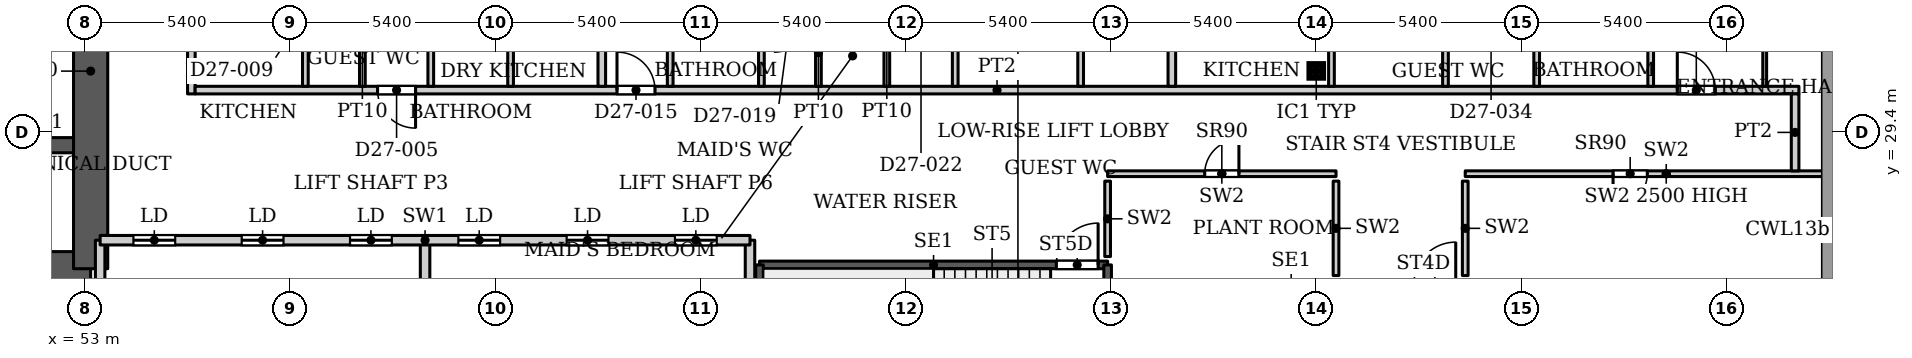
"""IFC4 building model, lengths in metres.
Left out: names, types, materials, properties, quantities, classifications, styles, units other than length and angle.
Written with IfcOpenShell. Run it as: python <this file> out.ifc"""

import sys

from ifc_helpers import new_model, si_unit, direction, frame, frame_2d, origin, origin_2d, place, context, subcontext, project, spatial, rectangle, hollow_rectangle, extrude, source, transform, mapped, element, fill, save


model = new_model("IFC4")
c1 = context("Model", 3, precision=1e-05, world=origin(), true_north=direction((0.0, 1.0)))
c2 = subcontext(c1, "Body", "Model", "MODEL_VIEW")
j1 = project(units=[si_unit("LENGTHUNIT", "METRE"), si_unit("PLANEANGLEUNIT", "RADIAN")], contexts=[c1])
p1 = place(None, origin())
s1 = spatial("IfcSite", under=j1, at=p1, CompositionType="ELEMENT")
p2 = place(p1, origin())
s2 = spatial("IfcBuilding", under=s1, at=p2, CompositionType="ELEMENT")
p3 = place(p2, frame((0.0, 0.0, 117.5)))
s3 = spatial("IfcBuildingStorey", under=s2, at=p3, CompositionType="ELEMENT", Elevation=117.5)
p4 = place(p3, frame((85.4, 31.005, 0.0), z_axis=(0.0, 0.0, 1.0), x_axis=(1.0, 0.0, 0.0)))
e1 = element("IfcColumn", 1, at=p4, inside=s3, PredefinedType="COLUMN", context=c2, shape_type="SweptSolid", body=[
    extrude(hollow_rectangle(XDim=0.356, YDim=0.356, WallThickness=0.016, InnerFilletRadius=0.016, OuterFilletRadius=0.032, at=origin_2d()), origin(), (0.0, 0.0, 1.0), 3.9),
])
p5 = place(p3, frame((34.75, 25.8, 0.0), z_axis=(0.0, 0.0, 1.0), x_axis=(1.0, 0.0, 0.0)))
e2 = element("IfcWall", 2, at=p5, inside=s3, PredefinedType="SHEAR", context=c2, shape_type="SweptSolid", body=[
    extrude(rectangle(XDim=18.4, YDim=0.9, at=frame_2d((9.2, 0.0))), origin(), (0.0, 0.0, 1.0), 3.9),
])
p6 = place(p3, frame((34.75, 29.05, 0.0), z_axis=(0.0, 0.0, 1.0), x_axis=(1.0, 0.0, 0.0)))
e3 = element("IfcWall", 3, at=p6, inside=s3, PredefinedType="SHEAR", context=c2, shape_type="SweptSolid", body=[
    extrude(rectangle(XDim=18.4, YDim=0.4, at=frame_2d((9.2, 0.0))), origin(), (0.0, 0.0, 1.0), 3.9),
])
p7 = place(p6, frame((15.125, 0.0, 0.0)))
e4 = element("IfcOpeningElement", 4, at=p7, cuts=e3, PredefinedType="OPENING", context=c2, shape_type="SweptSolid", body=[
    extrude(rectangle(XDim=1.1, YDim=2.2, at=frame_2d((0.55, 1.1))), frame((0.0, 0.21, 0.0), z_axis=(0.0, -1.0, 0.0), x_axis=(1.0, 0.0, 0.0)), (0.0, 0.0, 1.0), 0.42),
])
p8 = place(p3, frame((53.15, 25.8, 0.0), z_axis=(0.0, 0.0, 1.0), x_axis=(0.0, 1.0, 0.0)))
e5 = element("IfcWall", 5, at=p8, inside=s3, PredefinedType="SHEAR", context=c2, shape_type="SweptSolid", body=[
    extrude(rectangle(XDim=10.4, YDim=0.9, at=frame_2d((5.2, 0.0))), origin(), (0.0, 0.0, 1.0), 3.9),
])
p9 = place(p3, frame((70.75, 25.9, 0.0), z_axis=(0.0, 0.0, 1.0), x_axis=(1.0, 0.0, 0.0)))
e6 = element("IfcWall", 6, at=p9, inside=s3, PredefinedType="SHEAR", context=c2, shape_type="SweptSolid", body=[
    extrude(rectangle(XDim=9.16, YDim=0.2, at=frame_2d((4.58, 0.0))), origin(), (0.0, 0.0, 1.0), 3.9),
])
p10 = place(p9, frame((7.81, 0.0, 0.0)))
e7 = element("IfcOpeningElement", 7, at=p10, cuts=e6, PredefinedType="OPENING", context=c2, shape_type="SweptSolid", body=[
    extrude(rectangle(XDim=1.1, YDim=2.2, at=frame_2d((0.55, 1.1))), frame((0.0, 0.11, 0.0), z_axis=(0.0, -1.0, 0.0), x_axis=(1.0, 0.0, 0.0)), (0.0, 0.0, 1.0), 0.22),
])
for number, where, z_axis, x_axis in (
    (8, (70.75, 22.75, 0.0), (0.0, 0.0, 1.0), (0.0, 1.0, 0.0)),
    (9, (79.91, 22.75, 0.0), (0.0, 0.0, 1.0), (0.0, 1.0, 0.0)),
):
    element("IfcWall", number, at=place(p3, frame(where, z_axis=z_axis, x_axis=x_axis)), inside=s3, PredefinedType="SHEAR", context=c2, shape_type="SweptSolid", body=[
        extrude(rectangle(XDim=3.15, YDim=0.2, at=frame_2d((1.575, 0.0))), origin(), (0.0, 0.0, 1.0), 3.9),
    ])
for number, where, z_axis, x_axis in (
    (10, (53.4, 23.7, 0.0), (0.0, 0.0, 1.0), (0.0, 1.0, 0.0)),
    (11, (61.95, 23.7, 0.0), (0.0, 0.0, 1.0), (0.0, 1.0, 0.0)),
    (12, (70.5, 23.7, 0.0), (0.0, 0.0, 1.0), (0.0, 1.0, 0.0)),
):
    element("IfcWall", number, at=place(p3, frame(where, z_axis=z_axis, x_axis=x_axis)), inside=s3, PredefinedType="PARTITIONING", context=c2, shape_type="SweptSolid", body=[
        extrude(rectangle(XDim=2.85, YDim=0.25, at=frame_2d((1.425, 0.0))), origin(), (0.0, 0.0, 1.0), 3.9),
    ])
p11 = place(p3, frame((53.4, 26.55, 0.0), z_axis=(0.0, 0.0, 1.0), x_axis=(1.0, 0.0, 0.0)))
e13 = element("IfcWall", 13, at=p11, inside=s3, PredefinedType="PARTITIONING", context=c2, shape_type="SweptSolid", body=[
    extrude(rectangle(XDim=17.1, YDim=0.25, at=frame_2d((8.55, 0.0))), origin(), (0.0, 0.0, 1.0), 3.9),
])
p12 = place(p11, frame((0.875, 0.0, 0.0)))
e14 = element("IfcOpeningElement", 14, at=p12, cuts=e13, PredefinedType="OPENING", context=c2, shape_type="SweptSolid", body=[
    extrude(rectangle(XDim=1.1, YDim=2.2, at=frame_2d((0.55, 1.1))), frame((0.0, 0.135, 0.0), z_axis=(0.0, -1.0, 0.0), x_axis=(1.0, 0.0, 0.0)), (0.0, 0.0, 1.0), 0.27),
])
p13 = place(p11, frame((3.725, 0.0, 0.0)))
e15 = element("IfcOpeningElement", 15, at=p13, cuts=e13, PredefinedType="OPENING", context=c2, shape_type="SweptSolid", body=[
    extrude(rectangle(XDim=1.1, YDim=2.2, at=frame_2d((0.55, 1.1))), frame((0.0, 0.135, 0.0), z_axis=(0.0, -1.0, 0.0), x_axis=(1.0, 0.0, 0.0)), (0.0, 0.0, 1.0), 0.27),
])
p14 = place(p11, frame((6.575, 0.0, 0.0)))
e16 = element("IfcOpeningElement", 16, at=p14, cuts=e13, PredefinedType="OPENING", context=c2, shape_type="SweptSolid", body=[
    extrude(rectangle(XDim=1.1, YDim=2.2, at=frame_2d((0.55, 1.1))), frame((0.0, 0.135, 0.0), z_axis=(0.0, -1.0, 0.0), x_axis=(1.0, 0.0, 0.0)), (0.0, 0.0, 1.0), 0.27),
])
p15 = place(p11, frame((9.425, 0.0, 0.0)))
e17 = element("IfcOpeningElement", 17, at=p15, cuts=e13, PredefinedType="OPENING", context=c2, shape_type="SweptSolid", body=[
    extrude(rectangle(XDim=1.1, YDim=2.2, at=frame_2d((0.55, 1.1))), frame((0.0, 0.135, 0.0), z_axis=(0.0, -1.0, 0.0), x_axis=(1.0, 0.0, 0.0)), (0.0, 0.0, 1.0), 0.27),
])
p16 = place(p11, frame((12.275, 0.0, 0.0)))
e18 = element("IfcOpeningElement", 18, at=p16, cuts=e13, PredefinedType="OPENING", context=c2, shape_type="SweptSolid", body=[
    extrude(rectangle(XDim=1.1, YDim=2.2, at=frame_2d((0.55, 1.1))), frame((0.0, 0.135, 0.0), z_axis=(0.0, -1.0, 0.0), x_axis=(1.0, 0.0, 0.0)), (0.0, 0.0, 1.0), 0.27),
])
p17 = place(p11, frame((15.125, 0.0, 0.0)))
e19 = element("IfcOpeningElement", 19, at=p17, cuts=e13, PredefinedType="OPENING", context=c2, shape_type="SweptSolid", body=[
    extrude(rectangle(XDim=1.1, YDim=2.2, at=frame_2d((0.55, 1.1))), frame((0.0, 0.135, 0.0), z_axis=(0.0, -1.0, 0.0), x_axis=(1.0, 0.0, 0.0)), (0.0, 0.0, 1.0), 0.27),
])
p18 = place(p3, frame((79.91, 28.3, 0.0), z_axis=(0.0, 0.0, 1.0), x_axis=(1.0, 0.0, 0.0)))
e20 = element("IfcWall", 20, at=p18, inside=s3, PredefinedType="PARTITIONING", context=c2, shape_type="SweptSolid", body=[
    extrude(rectangle(XDim=6.01, YDim=0.15, at=frame_2d((3.005, 0.0))), origin(), (0.0, 0.0, 1.0), 3.9),
])
p19 = place(p18, frame((2.555, 0.0, 0.0)))
e21 = element("IfcOpeningElement", 21, at=p19, cuts=e20, PredefinedType="OPENING", context=c2, shape_type="SweptSolid", body=[
    extrude(rectangle(XDim=0.9, YDim=2.2, at=frame_2d((0.45, 1.1))), frame((0.0, 0.085, 0.0), z_axis=(0.0, -1.0, 0.0), x_axis=(1.0, 0.0, 0.0)), (0.0, 0.0, 1.0), 0.17),
])
p20 = place(p3, frame((79.91, 26.12, 0.0), z_axis=(0.0, 0.0, 1.0), x_axis=(0.0, 1.0, 0.0)))
e22 = element("IfcWall", 22, at=p20, inside=s3, PredefinedType="PARTITIONING", context=c2, shape_type="SweptSolid", body=[
    extrude(rectangle(XDim=1.985, YDim=0.15, at=frame_2d((0.992, 0.0))), origin(), (0.0, 0.0, 1.0), 3.9),
])
p21 = place(p3, frame((85.92, 25.62, 0.0), z_axis=(0.0, 0.0, 1.0), x_axis=(0.0, 1.0, 0.0)))
e23 = element("IfcWall", 23, at=p21, inside=s3, PredefinedType="PARTITIONING", context=c2, shape_type="SweptSolid", body=[
    extrude(rectangle(XDim=2.485, YDim=0.15, at=frame_2d((1.242, 0.0))), origin(), (0.0, 0.0, 1.0), 3.9),
])
p22 = place(p3, frame((89.32, 28.3, 0.0), z_axis=(0.0, 0.0, 1.0), x_axis=(1.0, 0.0, 0.0)))
e24 = element("IfcWall", 24, at=p22, inside=s3, PredefinedType="PARTITIONING", context=c2, shape_type="SweptSolid", body=[
    extrude(rectangle(XDim=10.578, YDim=0.15, at=frame_2d((5.289, 0.0))), origin(), (0.0, 0.0, 1.0), 2.5),
])
p23 = place(p22, frame((3.89, 0.0, 0.0)))
e25 = element("IfcOpeningElement", 25, at=p23, cuts=e24, PredefinedType="OPENING", context=c2, shape_type="SweptSolid", body=[
    extrude(rectangle(XDim=0.9, YDim=2.2, at=frame_2d((0.45, 1.1))), frame((0.0, 0.085, 0.0), z_axis=(0.0, -1.0, 0.0), x_axis=(1.0, 0.0, 0.0)), (0.0, 0.0, 1.0), 0.17),
])
p24 = place(p3, frame((89.32, 25.62, 0.0), z_axis=(0.0, 0.0, 1.0), x_axis=(0.0, 1.0, 0.0)))
e26 = element("IfcWall", 26, at=p24, inside=s3, PredefinedType="PARTITIONING", context=c2, shape_type="SweptSolid", body=[
    extrude(rectangle(XDim=2.485, YDim=0.15, at=frame_2d((1.242, 0.0))), origin(), (0.0, 0.0, 1.0), 3.9),
])
p25 = place(p3, frame((55.8, 30.4, 0.0), z_axis=(0.0, 0.0, 1.0), x_axis=(0.0, 1.0, 0.0)))
e27 = element("IfcWall", 27, at=p25, inside=s3, PredefinedType="PARTITIONING", context=c2, shape_type="SweptSolid", body=[
    extrude(rectangle(XDim=13.5, YDim=0.2, at=frame_2d((6.75, 0.0))), origin(), (0.0, 0.0, 1.0), 3.6),
])
p26 = place(p3, frame((55.9, 30.5, 0.0), z_axis=(0.0, 0.0, 1.0), x_axis=(1.0, 0.0, 0.0)))
e28 = element("IfcWall", 28, at=p26, inside=s3, PredefinedType="PARTITIONING", context=c2, shape_type="SweptSolid", body=[
    extrude(rectangle(XDim=42.2, YDim=0.2, at=frame_2d((21.1, 0.0))), origin(), (0.0, 0.0, 1.0), 3.6),
])
p27 = place(p26, frame((4.8, 0.0, 0.0)))
e29 = element("IfcOpeningElement", 29, at=p27, cuts=e28, PredefinedType="OPENING", context=c2, shape_type="SweptSolid", body=[
    extrude(rectangle(XDim=1.0, YDim=2.1, at=frame_2d((0.5, 1.05))), frame((0.0, 0.11, 0.0), z_axis=(0.0, -1.0, 0.0), x_axis=(1.0, 0.0, 0.0)), (0.0, 0.0, 1.0), 0.22),
])
p28 = place(p26, frame((11.1, 0.0, 0.0)))
e30 = element("IfcOpeningElement", 30, at=p28, cuts=e28, PredefinedType="OPENING", context=c2, shape_type="SweptSolid", body=[
    extrude(rectangle(XDim=1.0, YDim=2.1, at=frame_2d((0.5, 1.05))), frame((0.0, 0.11, 0.0), z_axis=(0.0, -1.0, 0.0), x_axis=(1.0, 0.0, 0.0)), (0.0, 0.0, 1.0), 0.22),
])
p29 = place(p26, frame((39.0, 0.0, 0.0)))
e31 = element("IfcOpeningElement", 31, at=p29, cuts=e28, PredefinedType="OPENING", context=c2, shape_type="SweptSolid", body=[
    extrude(rectangle(XDim=1.0, YDim=2.1, at=frame_2d((0.5, 1.05))), frame((0.0, 0.11, 0.0), z_axis=(0.0, -1.0, 0.0), x_axis=(1.0, 0.0, 0.0)), (0.0, 0.0, 1.0), 0.22),
])
for number, where, z_axis, x_axis in (
    (32, (58.8, 30.6, 0.0), (0.0, 0.0, 1.0), (0.0, 1.0, 0.0)),
    (33, (60.3, 30.6, 0.0), (0.0, 0.0, 1.0), (0.0, 1.0, 0.0)),
    (34, (62.1, 30.6, 0.0), (0.0, 0.0, 1.0), (0.0, 1.0, 0.0)),
    (35, (64.2, 30.6, 0.0), (0.0, 0.0, 1.0), (0.0, 1.0, 0.0)),
):
    element("IfcWall", number, at=place(p3, frame(where, z_axis=z_axis, x_axis=x_axis)), inside=s3, PredefinedType="PARTITIONING", context=c2, shape_type="SweptSolid", body=[
        extrude(rectangle(XDim=3.025, YDim=0.15, at=frame_2d((1.512, 0.0))), origin(), (0.0, 0.0, 1.0), 3.6),
    ])
p30 = place(p3, frame((66.6, 30.6, 0.0), z_axis=(0.0, 0.0, 1.0), x_axis=(0.0, 1.0, 0.0)))
e36 = element("IfcWall", 36, at=p30, inside=s3, PredefinedType="PARTITIONING", context=c2, shape_type="SweptSolid", body=[
    extrude(rectangle(XDim=13.3, YDim=0.2, at=frame_2d((6.65, 0.0))), origin(), (0.0, 0.0, 1.0), 3.6),
])
for number, where, z_axis, x_axis in (
    (37, (68.4, 30.6, 0.0), (0.0, 0.0, 1.0), (0.0, 1.0, 0.0)),
    (38, (70.8, 30.6, 0.0), (0.0, 0.0, 1.0), (0.0, 1.0, 0.0)),
):
    element("IfcWall", number, at=place(p3, frame(where, z_axis=z_axis, x_axis=x_axis)), inside=s3, PredefinedType="PARTITIONING", context=c2, shape_type="SweptSolid", body=[
        extrude(rectangle(XDim=3.025, YDim=0.15, at=frame_2d((1.512, 0.0))), origin(), (0.0, 0.0, 1.0), 3.6),
    ])
p31 = place(p3, frame((72.3, 30.6, 0.0), z_axis=(0.0, 0.0, 1.0), x_axis=(0.0, 1.0, 0.0)))
e39 = element("IfcWall", 39, at=p31, inside=s3, PredefinedType="PARTITIONING", context=c2, shape_type="SweptSolid", body=[
    extrude(rectangle(XDim=1.775, YDim=0.15, at=frame_2d((0.887, 0.0))), origin(), (0.0, 0.0, 1.0), 3.6),
])
for number, where, z_axis, x_axis in (
    (40, (74.1, 30.6, 0.0), (0.0, 0.0, 1.0), (0.0, 1.0, 0.0)),
    (41, (75.9, 30.6, 0.0), (0.0, 0.0, 1.0), (0.0, 1.0, 0.0)),
    (42, (79.2, 30.6, 0.0), (0.0, 0.0, 1.0), (0.0, 1.0, 0.0)),
):
    element("IfcWall", number, at=place(p3, frame(where, z_axis=z_axis, x_axis=x_axis)), inside=s3, PredefinedType="PARTITIONING", context=c2, shape_type="SweptSolid", body=[
        extrude(rectangle(XDim=3.025, YDim=0.15, at=frame_2d((1.512, 0.0))), origin(), (0.0, 0.0, 1.0), 3.6),
    ])
p32 = place(p3, frame((81.6, 30.6, 0.0), z_axis=(0.0, 0.0, 1.0), x_axis=(0.0, 1.0, 0.0)))
e43 = element("IfcWall", 43, at=p32, inside=s3, PredefinedType="PARTITIONING", context=c2, shape_type="SweptSolid", body=[
    extrude(rectangle(XDim=13.3, YDim=0.2, at=frame_2d((6.65, 0.0))), origin(), (0.0, 0.0, 1.0), 3.6),
])
for number, where, z_axis, x_axis in (
    (44, (85.8, 30.6, 0.0), (0.0, 0.0, 1.0), (0.0, 1.0, 0.0)),
    (45, (88.8, 30.6, 0.0), (0.0, 0.0, 1.0), (0.0, 1.0, 0.0)),
    (46, (91.2, 30.6, 0.0), (0.0, 0.0, 1.0), (0.0, 1.0, 0.0)),
    (47, (94.2, 30.6, 0.0), (0.0, 0.0, 1.0), (0.0, 1.0, 0.0)),
):
    element("IfcWall", number, at=place(p3, frame(where, z_axis=z_axis, x_axis=x_axis)), inside=s3, PredefinedType="PARTITIONING", context=c2, shape_type="SweptSolid", body=[
        extrude(rectangle(XDim=3.025, YDim=0.15, at=frame_2d((1.512, 0.0))), origin(), (0.0, 0.0, 1.0), 3.6),
    ])
p33 = place(p3, frame((97.2, 30.6, 0.0), z_axis=(0.0, 0.0, 1.0), x_axis=(0.0, 1.0, 0.0)))
e48 = element("IfcWall", 48, at=p33, inside=s3, PredefinedType="PARTITIONING", context=c2, shape_type="SweptSolid", body=[
    extrude(rectangle(XDim=3.15, YDim=0.1, at=frame_2d((1.575, 0.0))), origin(), (0.0, 0.0, 1.0), 3.6),
])
p34 = place(p3, frame((98.0, 28.374, 0.0), z_axis=(0.0, 0.0, 1.0), x_axis=(0.0, 1.0, 0.0)))
e49 = element("IfcWall", 49, at=p34, inside=s3, PredefinedType="PARTITIONING", context=c2, shape_type="SweptSolid", body=[
    extrude(rectangle(XDim=2.026, YDim=0.2, at=frame_2d((1.013, 0.0))), origin(), (0.0, 0.0, 1.0), 3.6),
])
m1 = source(origin(), c2, "Body", "SweptSolid", [
    extrude(rectangle(XDim=1.1, YDim=2.2, at=frame_2d((0.55, 1.1))), frame((0.0, 0.025, 0.0), z_axis=(0.0, -1.0, 0.0), x_axis=(1.0, 0.0, 0.0)), (0.0, 0.0, 1.0), 0.05),
])
p35 = place(p12, origin())
e50 = element("IfcDoor", 50, at=p35, inside=s3, OperationType="SLIDING_TO_LEFT", PredefinedType="DOOR", context=c2, shape_type="MappedRepresentation", body=[
    mapped(m1, transform((0.0, 0.0, 0.0), x_axis=(1.0, 0.0, 0.0), y_axis=(0.0, 1.0, 0.0), z_axis=(0.0, 0.0, 1.0), scale=1.0)),
])
fill(e14, e50)
p36 = place(p13, origin())
e51 = element("IfcDoor", 51, at=p36, inside=s3, OperationType="SLIDING_TO_LEFT", PredefinedType="DOOR", context=c2, shape_type="MappedRepresentation", body=[
    mapped(m1, transform((0.0, 0.0, 0.0), x_axis=(1.0, 0.0, 0.0), y_axis=(0.0, 1.0, 0.0), z_axis=(0.0, 0.0, 1.0), scale=1.0)),
])
fill(e15, e51)
p37 = place(p14, origin())
e52 = element("IfcDoor", 52, at=p37, inside=s3, OperationType="SLIDING_TO_LEFT", PredefinedType="DOOR", context=c2, shape_type="MappedRepresentation", body=[
    mapped(m1, transform((0.0, 0.0, 0.0), x_axis=(1.0, 0.0, 0.0), y_axis=(0.0, 1.0, 0.0), z_axis=(0.0, 0.0, 1.0), scale=1.0)),
])
fill(e16, e52)
p38 = place(p15, origin())
e53 = element("IfcDoor", 53, at=p38, inside=s3, OperationType="SLIDING_TO_LEFT", PredefinedType="DOOR", context=c2, shape_type="MappedRepresentation", body=[
    mapped(m1, transform((0.0, 0.0, 0.0), x_axis=(1.0, 0.0, 0.0), y_axis=(0.0, 1.0, 0.0), z_axis=(0.0, 0.0, 1.0), scale=1.0)),
])
fill(e17, e53)
p39 = place(p16, origin())
e54 = element("IfcDoor", 54, at=p39, inside=s3, OperationType="SLIDING_TO_LEFT", PredefinedType="DOOR", context=c2, shape_type="MappedRepresentation", body=[
    mapped(m1, transform((0.0, 0.0, 0.0), x_axis=(1.0, 0.0, 0.0), y_axis=(0.0, 1.0, 0.0), z_axis=(0.0, 0.0, 1.0), scale=1.0)),
])
fill(e18, e54)
p40 = place(p17, origin())
e55 = element("IfcDoor", 55, at=p40, inside=s3, OperationType="SLIDING_TO_LEFT", PredefinedType="DOOR", context=c2, shape_type="MappedRepresentation", body=[
    mapped(m1, transform((0.0, 0.0, 0.0), x_axis=(1.0, 0.0, 0.0), y_axis=(0.0, 1.0, 0.0), z_axis=(0.0, 0.0, 1.0), scale=1.0)),
])
fill(e19, e55)
m2 = source(origin(), c2, "Body", "SweptSolid", [
    extrude(rectangle(XDim=0.9, YDim=2.2, at=frame_2d((0.45, 1.1))), frame((0.0, 0.025, 0.0), z_axis=(0.0, -1.0, 0.0), x_axis=(1.0, 0.0, 0.0)), (0.0, 0.0, 1.0), 0.05),
])
p41 = place(p19, origin())
e56 = element("IfcDoor", 56, at=p41, inside=s3, OperationType="SINGLE_SWING_LEFT", PredefinedType="DOOR", context=c2, shape_type="MappedRepresentation", body=[
    mapped(m2, transform((0.0, 0.0, 0.0), x_axis=(1.0, 0.0, 0.0), y_axis=(0.0, 1.0, 0.0), z_axis=(0.0, 0.0, 1.0), scale=1.0)),
])
fill(e21, e56)
p42 = place(p23, origin())
e57 = element("IfcDoor", 57, at=p42, inside=s3, OperationType="SINGLE_SWING_RIGHT", PredefinedType="DOOR", context=c2, shape_type="MappedRepresentation", body=[
    mapped(m2, transform((0.0, 0.0, 0.0), x_axis=(1.0, 0.0, 0.0), y_axis=(0.0, 1.0, 0.0), z_axis=(0.0, 0.0, 1.0), scale=1.0)),
])
fill(e25, e57)
m3 = source(origin(), c2, "Body", "SweptSolid", [
    extrude(rectangle(XDim=1.1, YDim=2.2, at=frame_2d((0.55, 1.1))), frame((0.0, 0.025, 0.0), z_axis=(0.0, -1.0, 0.0), x_axis=(1.0, 0.0, 0.0)), (0.0, 0.0, 1.0), 0.05),
])
p43 = place(p10, origin())
e58 = element("IfcDoor", 58, at=p43, inside=s3, OperationType="SINGLE_SWING_LEFT", PredefinedType="DOOR", context=c2, shape_type="MappedRepresentation", body=[
    mapped(m3, transform((0.0, 0.0, 0.0), x_axis=(1.0, 0.0, 0.0), y_axis=(0.0, 1.0, 0.0), z_axis=(0.0, 0.0, 1.0), scale=1.0)),
])
fill(e7, e58)
m4 = source(origin(), c2, "Body", "SweptSolid", [
    extrude(rectangle(XDim=1.0, YDim=2.1, at=frame_2d((0.5, 1.05))), frame((0.0, 0.025, 0.0), z_axis=(0.0, -1.0, 0.0), x_axis=(1.0, 0.0, 0.0)), (0.0, 0.0, 1.0), 0.05),
])
p44 = place(p27, origin())
e59 = element("IfcDoor", 59, at=p44, inside=s3, OperationType="SINGLE_SWING_RIGHT", PredefinedType="DOOR", context=c2, shape_type="MappedRepresentation", body=[
    mapped(m4, transform((0.0, 0.0, 0.0), x_axis=(1.0, 0.0, 0.0), y_axis=(0.0, 1.0, 0.0), z_axis=(0.0, 0.0, 1.0), scale=1.0)),
])
fill(e29, e59)
p45 = place(p28, origin())
e60 = element("IfcDoor", 60, at=p45, inside=s3, OperationType="SINGLE_SWING_LEFT", PredefinedType="DOOR", context=c2, shape_type="MappedRepresentation", body=[
    mapped(m4, transform((0.0, 0.0, 0.0), x_axis=(1.0, 0.0, 0.0), y_axis=(0.0, 1.0, 0.0), z_axis=(0.0, 0.0, 1.0), scale=1.0)),
])
fill(e30, e60)
p46 = place(p29, origin())
e61 = element("IfcDoor", 61, at=p46, inside=s3, OperationType="SINGLE_SWING_LEFT", PredefinedType="DOOR", context=c2, shape_type="MappedRepresentation", body=[
    mapped(m4, transform((0.0, 0.0, 0.0), x_axis=(1.0, 0.0, 0.0), y_axis=(0.0, 1.0, 0.0), z_axis=(0.0, 0.0, 1.0), scale=1.0)),
])
fill(e31, e61)
save(model, sys.argv[1])
